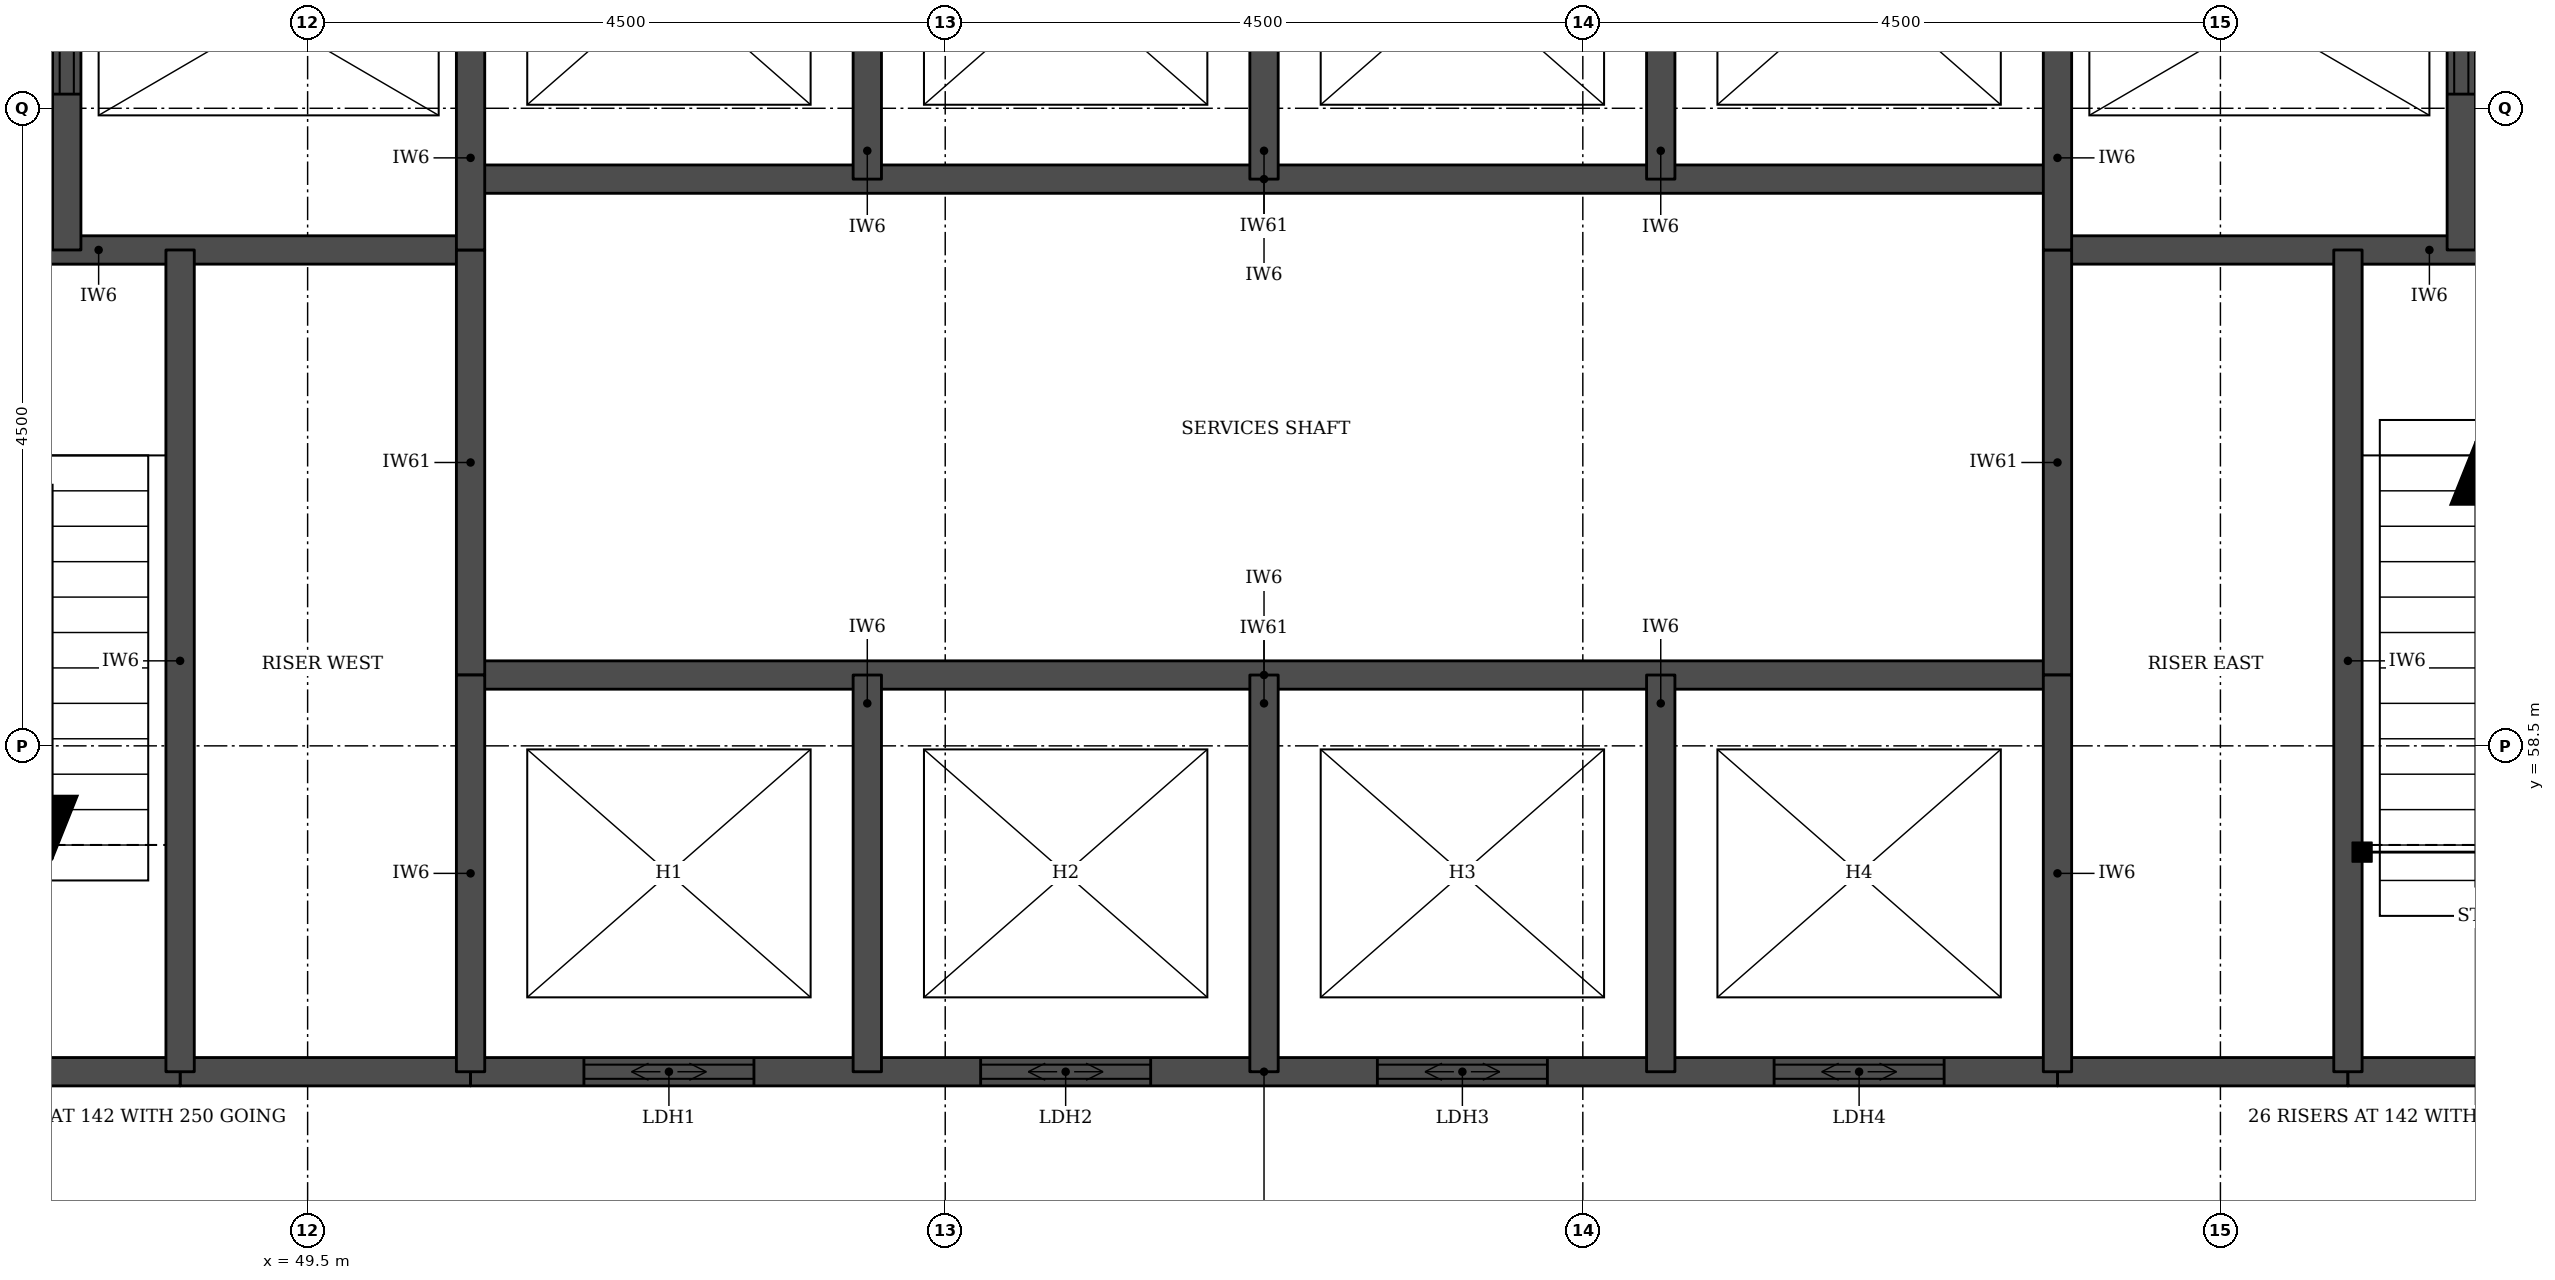
"""IFC4 building model, lengths in metres.
Left out: names, types, materials, properties, quantities, classifications, styles, units other than length and angle.
Written with IfcOpenShell. Run it as: python <this file> out.ifc"""

import sys

from ifc_helpers import new_model, si_unit, direction, frame, frame_2d, origin, place, context, subcontext, project, spatial, rectangle, extrude, element, fill, save


model = new_model("IFC4")
c1 = context("Model", 3, precision=1e-05, world=origin(), true_north=direction((0.0, 1.0)))
c2 = subcontext(c1, "Body", "Model", "MODEL_VIEW")
j1 = project(units=[si_unit("LENGTHUNIT", "METRE"), si_unit("PLANEANGLEUNIT", "RADIAN")], contexts=[c1])
p1 = place(None, origin())
s1 = spatial("IfcSite", under=j1, at=p1, CompositionType="ELEMENT")
p2 = place(p1, origin())
s2 = spatial("IfcBuilding", under=s1, at=p2, CompositionType="ELEMENT")
p3 = place(p2, frame((0.0, 0.0, 203.2)))
s3 = spatial("IfcBuildingStorey", under=s2, at=p3, CompositionType="ELEMENT", Elevation=203.2)
for number, where, z_axis, x_axis in (
    (1, (48.6, 56.2, 0.0), (0.0, 0.0, 1.0), (1.0, 0.0, 0.0)),
    (2, (61.85, 56.2, 0.0), (0.0, 0.0, 1.0), (1.0, 0.0, 0.0)),
):
    element("IfcWall", number, at=place(p3, frame(where, z_axis=z_axis, x_axis=x_axis)), inside=s3, PredefinedType="SOLIDWALL", context=c2, shape_type="SweptSolid", body=[
        extrude(rectangle(XDim=2.05, YDim=0.2, at=frame_2d((1.025, 0.0))), origin(), (0.0, 0.0, 1.0), 3.55),
    ])
p4 = place(p3, frame((45.4, 56.2, 0.0), z_axis=(0.0, 0.0, 1.0), x_axis=(1.0, 0.0, 0.0)))
e3 = element("IfcWall", 3, at=p4, inside=s3, PredefinedType="SOLIDWALL", context=c2, shape_type="SweptSolid", body=[
    extrude(rectangle(XDim=3.2, YDim=0.2, at=frame_2d((1.6, 0.0))), origin(), (0.0, 0.0, 1.0), 3.55),
])
p5 = place(p3, frame((50.65, 56.2, 0.0), z_axis=(0.0, 0.0, 1.0), x_axis=(1.0, 0.0, 0.0)))
e4 = element("IfcWall", 4, at=p5, inside=s3, PredefinedType="SOLIDWALL", context=c2, shape_type="SweptSolid", body=[
    extrude(rectangle(XDim=11.2, YDim=0.2, at=frame_2d((5.6, 0.0))), origin(), (0.0, 0.0, 1.0), 3.55),
])
p6 = place(p5, frame((0.8, 0.0, 0.0)))
e5 = element("IfcOpeningElement", 5, at=p6, cuts=e4, PredefinedType="OPENING", context=c2, shape_type="SweptSolid", body=[
    extrude(rectangle(XDim=1.2, YDim=2.1, at=frame_2d((0.6, 1.05))), frame((0.0, 0.11, 0.0), z_axis=(0.0, -1.0, 0.0), x_axis=(1.0, 0.0, 0.0)), (0.0, 0.0, 1.0), 0.22),
])
p7 = place(p5, frame((3.6, 0.0, 0.0)))
e6 = element("IfcOpeningElement", 6, at=p7, cuts=e4, PredefinedType="OPENING", context=c2, shape_type="SweptSolid", body=[
    extrude(rectangle(XDim=1.2, YDim=2.1, at=frame_2d((0.6, 1.05))), frame((0.0, 0.11, 0.0), z_axis=(0.0, -1.0, 0.0), x_axis=(1.0, 0.0, 0.0)), (0.0, 0.0, 1.0), 0.22),
])
p8 = place(p5, frame((6.4, 0.0, 0.0)))
e7 = element("IfcOpeningElement", 7, at=p8, cuts=e4, PredefinedType="OPENING", context=c2, shape_type="SweptSolid", body=[
    extrude(rectangle(XDim=1.2, YDim=2.1, at=frame_2d((0.6, 1.05))), frame((0.0, 0.11, 0.0), z_axis=(0.0, -1.0, 0.0), x_axis=(1.0, 0.0, 0.0)), (0.0, 0.0, 1.0), 0.22),
])
p9 = place(p5, frame((9.2, 0.0, 0.0)))
e8 = element("IfcOpeningElement", 8, at=p9, cuts=e4, PredefinedType="OPENING", context=c2, shape_type="SweptSolid", body=[
    extrude(rectangle(XDim=1.2, YDim=2.1, at=frame_2d((0.6, 1.05))), frame((0.0, 0.11, 0.0), z_axis=(0.0, -1.0, 0.0), x_axis=(1.0, 0.0, 0.0)), (0.0, 0.0, 1.0), 0.22),
])
p10 = place(p3, frame((63.9, 56.2, 0.0), z_axis=(0.0, 0.0, 1.0), x_axis=(1.0, 0.0, 0.0)))
e9 = element("IfcWall", 9, at=p10, inside=s3, PredefinedType="SOLIDWALL", context=c2, shape_type="SweptSolid", body=[
    extrude(rectangle(XDim=3.2, YDim=0.2, at=frame_2d((1.6, 0.0))), origin(), (0.0, 0.0, 1.0), 3.55),
])
p11 = place(p3, frame((50.65, 59.0, 0.0), z_axis=(0.0, 0.0, 1.0), x_axis=(1.0, 0.0, 0.0)))
e10 = element("IfcWall", 10, at=p11, inside=s3, PredefinedType="SOLIDWALL", context=c2, shape_type="SweptSolid", body=[
    extrude(rectangle(XDim=11.2, YDim=0.2, at=frame_2d((5.6, 0.0))), origin(), (0.0, 0.0, 1.0), 3.7),
])
for number, where, z_axis, x_axis in (
    (11, (45.4, 62.0, 0.0), (0.0, 0.0, 1.0), (1.0, 0.0, 0.0)),
    (12, (61.85, 62.0, 0.0), (0.0, 0.0, 1.0), (1.0, 0.0, 0.0)),
):
    element("IfcWall", number, at=place(p3, frame(where, z_axis=z_axis, x_axis=x_axis)), inside=s3, PredefinedType="SOLIDWALL", context=c2, shape_type="SweptSolid", body=[
        extrude(rectangle(XDim=5.25, YDim=0.2, at=frame_2d((2.625, 0.0))), origin(), (0.0, 0.0, 1.0), 3.55),
    ])
p12 = place(p3, frame((50.65, 62.5, 0.0), z_axis=(0.0, 0.0, 1.0), x_axis=(1.0, 0.0, 0.0)))
e13 = element("IfcWall", 13, at=p12, inside=s3, PredefinedType="SOLIDWALL", context=c2, shape_type="SweptSolid", body=[
    extrude(rectangle(XDim=11.2, YDim=0.2, at=frame_2d((5.6, 0.0))), origin(), (0.0, 0.0, 1.0), 3.7),
])
p13 = place(p3, frame((47.8, 62.0, 0.0), z_axis=(0.0, 0.0, 1.0), x_axis=(0.0, 1.0, 0.0)))
e14 = element("IfcWall", 14, at=p13, inside=s3, PredefinedType="SOLIDWALL", context=c2, shape_type="SweptSolid", body=[
    extrude(rectangle(XDim=3.3, YDim=0.2, at=frame_2d((1.65, 0.0))), origin(), (0.0, 0.0, 1.0), 3.55),
])
p14 = place(p13, frame((1.1, 0.0, 0.0)))
e15 = element("IfcOpeningElement", 15, at=p14, cuts=e14, PredefinedType="OPENING", context=c2, shape_type="SweptSolid", body=[
    extrude(rectangle(XDim=1.1, YDim=2.1, at=frame_2d((0.55, 1.05))), frame((0.0, 0.11, 0.0), z_axis=(0.0, -1.0, 0.0), x_axis=(1.0, 0.0, 0.0)), (0.0, 0.0, 1.0), 0.22),
])
p15 = place(p3, frame((48.6, 56.2, 0.0), z_axis=(0.0, 0.0, 1.0), x_axis=(0.0, 1.0, 0.0)))
e16 = element("IfcWall", 16, at=p15, inside=s3, PredefinedType="SOLIDWALL", context=c2, shape_type="SweptSolid", body=[
    extrude(rectangle(XDim=5.8, YDim=0.2, at=frame_2d((2.9, 0.0))), origin(), (0.0, 0.0, 1.0), 3.55),
])
p16 = place(p3, frame((50.65, 59.0, 0.0), z_axis=(0.0, 0.0, 1.0), x_axis=(0.0, 1.0, 0.0)))
e17 = element("IfcWall", 17, at=p16, inside=s3, PredefinedType="SOLIDWALL", context=c2, shape_type="SweptSolid", body=[
    extrude(rectangle(XDim=3.0, YDim=0.2, at=frame_2d((1.5, 0.0))), origin(), (0.0, 0.0, 1.0), 3.7),
])
p17 = place(p3, frame((50.65, 56.2, 0.0), z_axis=(0.0, 0.0, 1.0), x_axis=(0.0, 1.0, 0.0)))
e18 = element("IfcWall", 18, at=p17, inside=s3, PredefinedType="SOLIDWALL", context=c2, shape_type="SweptSolid", body=[
    extrude(rectangle(XDim=2.8, YDim=0.2, at=frame_2d((1.4, 0.0))), origin(), (0.0, 0.0, 1.0), 3.55),
])
p18 = place(p3, frame((50.65, 62.0, 0.0), z_axis=(0.0, 0.0, 1.0), x_axis=(0.0, 1.0, 0.0)))
e19 = element("IfcWall", 19, at=p18, inside=s3, PredefinedType="SOLIDWALL", context=c2, shape_type="SweptSolid", body=[
    extrude(rectangle(XDim=3.3, YDim=0.2, at=frame_2d((1.65, 0.0))), origin(), (0.0, 0.0, 1.0), 3.55),
])
for number, where, z_axis, x_axis in (
    (20, (53.45, 56.2, 0.0), (0.0, 0.0, 1.0), (0.0, 1.0, 0.0)),
    (21, (53.45, 62.5, 0.0), (0.0, 0.0, 1.0), (0.0, 1.0, 0.0)),
    (22, (56.25, 56.2, 0.0), (0.0, 0.0, 1.0), (0.0, 1.0, 0.0)),
    (23, (56.25, 62.5, 0.0), (0.0, 0.0, 1.0), (0.0, 1.0, 0.0)),
    (24, (59.05, 56.2, 0.0), (0.0, 0.0, 1.0), (0.0, 1.0, 0.0)),
    (25, (59.05, 62.5, 0.0), (0.0, 0.0, 1.0), (0.0, 1.0, 0.0)),
):
    element("IfcWall", number, at=place(p3, frame(where, z_axis=z_axis, x_axis=x_axis)), inside=s3, PredefinedType="SOLIDWALL", context=c2, shape_type="SweptSolid", body=[
        extrude(rectangle(XDim=2.8, YDim=0.2, at=frame_2d((1.4, 0.0))), origin(), (0.0, 0.0, 1.0), 3.55),
    ])
p19 = place(p3, frame((61.85, 59.0, 0.0), z_axis=(0.0, 0.0, 1.0), x_axis=(0.0, 1.0, 0.0)))
e26 = element("IfcWall", 26, at=p19, inside=s3, PredefinedType="SOLIDWALL", context=c2, shape_type="SweptSolid", body=[
    extrude(rectangle(XDim=3.0, YDim=0.2, at=frame_2d((1.5, 0.0))), origin(), (0.0, 0.0, 1.0), 3.7),
])
p20 = place(p3, frame((61.85, 56.2, 0.0), z_axis=(0.0, 0.0, 1.0), x_axis=(0.0, 1.0, 0.0)))
e27 = element("IfcWall", 27, at=p20, inside=s3, PredefinedType="SOLIDWALL", context=c2, shape_type="SweptSolid", body=[
    extrude(rectangle(XDim=2.8, YDim=0.2, at=frame_2d((1.4, 0.0))), origin(), (0.0, 0.0, 1.0), 3.55),
])
p21 = place(p3, frame((61.85, 62.0, 0.0), z_axis=(0.0, 0.0, 1.0), x_axis=(0.0, 1.0, 0.0)))
e28 = element("IfcWall", 28, at=p21, inside=s3, PredefinedType="SOLIDWALL", context=c2, shape_type="SweptSolid", body=[
    extrude(rectangle(XDim=3.3, YDim=0.2, at=frame_2d((1.65, 0.0))), origin(), (0.0, 0.0, 1.0), 3.55),
])
p22 = place(p3, frame((63.9, 56.2, 0.0), z_axis=(0.0, 0.0, 1.0), x_axis=(0.0, 1.0, 0.0)))
e29 = element("IfcWall", 29, at=p22, inside=s3, PredefinedType="SOLIDWALL", context=c2, shape_type="SweptSolid", body=[
    extrude(rectangle(XDim=5.8, YDim=0.2, at=frame_2d((2.9, 0.0))), origin(), (0.0, 0.0, 1.0), 3.55),
])
p23 = place(p3, frame((64.7, 62.0, 0.0), z_axis=(0.0, 0.0, 1.0), x_axis=(0.0, 1.0, 0.0)))
e30 = element("IfcWall", 30, at=p23, inside=s3, PredefinedType="SOLIDWALL", context=c2, shape_type="SweptSolid", body=[
    extrude(rectangle(XDim=3.3, YDim=0.2, at=frame_2d((1.65, 0.0))), origin(), (0.0, 0.0, 1.0), 3.55),
])
p24 = place(p23, frame((1.1, 0.0, 0.0)))
e31 = element("IfcOpeningElement", 31, at=p24, cuts=e30, PredefinedType="OPENING", context=c2, shape_type="SweptSolid", body=[
    extrude(rectangle(XDim=1.1, YDim=2.1, at=frame_2d((0.55, 1.05))), frame((0.0, 0.11, 0.0), z_axis=(0.0, -1.0, 0.0), x_axis=(1.0, 0.0, 0.0)), (0.0, 0.0, 1.0), 0.22),
])
p25 = place(p6, origin())
e32 = element("IfcDoor", 32, at=p25, inside=s3, OperationType="DOUBLE_DOOR_SLIDING", PredefinedType="DOOR", context=c2, shape_type="SweptSolid", body=[
    extrude(rectangle(XDim=1.2, YDim=2.1, at=frame_2d((0.6, 1.05))), frame((0.0, 0.025, 0.0), z_axis=(0.0, -1.0, 0.0), x_axis=(1.0, 0.0, 0.0)), (0.0, 0.0, 1.0), 0.05),
])
fill(e5, e32)
p26 = place(p7, origin())
e33 = element("IfcDoor", 33, at=p26, inside=s3, OperationType="DOUBLE_DOOR_SLIDING", PredefinedType="DOOR", context=c2, shape_type="SweptSolid", body=[
    extrude(rectangle(XDim=1.2, YDim=2.1, at=frame_2d((0.6, 1.05))), frame((0.0, 0.025, 0.0), z_axis=(0.0, -1.0, 0.0), x_axis=(1.0, 0.0, 0.0)), (0.0, 0.0, 1.0), 0.05),
])
fill(e6, e33)
p27 = place(p8, origin())
e34 = element("IfcDoor", 34, at=p27, inside=s3, OperationType="DOUBLE_DOOR_SLIDING", PredefinedType="DOOR", context=c2, shape_type="SweptSolid", body=[
    extrude(rectangle(XDim=1.2, YDim=2.1, at=frame_2d((0.6, 1.05))), frame((0.0, 0.025, 0.0), z_axis=(0.0, -1.0, 0.0), x_axis=(1.0, 0.0, 0.0)), (0.0, 0.0, 1.0), 0.05),
])
fill(e7, e34)
p28 = place(p9, origin())
e35 = element("IfcDoor", 35, at=p28, inside=s3, OperationType="DOUBLE_DOOR_SLIDING", PredefinedType="DOOR", context=c2, shape_type="SweptSolid", body=[
    extrude(rectangle(XDim=1.2, YDim=2.1, at=frame_2d((0.6, 1.05))), frame((0.0, 0.025, 0.0), z_axis=(0.0, -1.0, 0.0), x_axis=(1.0, 0.0, 0.0)), (0.0, 0.0, 1.0), 0.05),
])
fill(e8, e35)
p29 = place(p14, origin())
e36 = element("IfcDoor", 36, at=p29, inside=s3, OperationType="DOUBLE_DOOR_SLIDING", PredefinedType="DOOR", context=c2, shape_type="SweptSolid", body=[
    extrude(rectangle(XDim=1.1, YDim=2.1, at=frame_2d((0.55, 1.05))), frame((0.0, 0.025, 0.0), z_axis=(0.0, -1.0, 0.0), x_axis=(1.0, 0.0, 0.0)), (0.0, 0.0, 1.0), 0.05),
])
fill(e15, e36)
p30 = place(p24, origin())
e37 = element("IfcDoor", 37, at=p30, inside=s3, OperationType="DOUBLE_DOOR_SLIDING", PredefinedType="DOOR", context=c2, shape_type="SweptSolid", body=[
    extrude(rectangle(XDim=1.1, YDim=2.1, at=frame_2d((0.55, 1.05))), frame((0.0, 0.025, 0.0), z_axis=(0.0, -1.0, 0.0), x_axis=(1.0, 0.0, 0.0)), (0.0, 0.0, 1.0), 0.05),
])
fill(e31, e37)
save(model, sys.argv[1])
